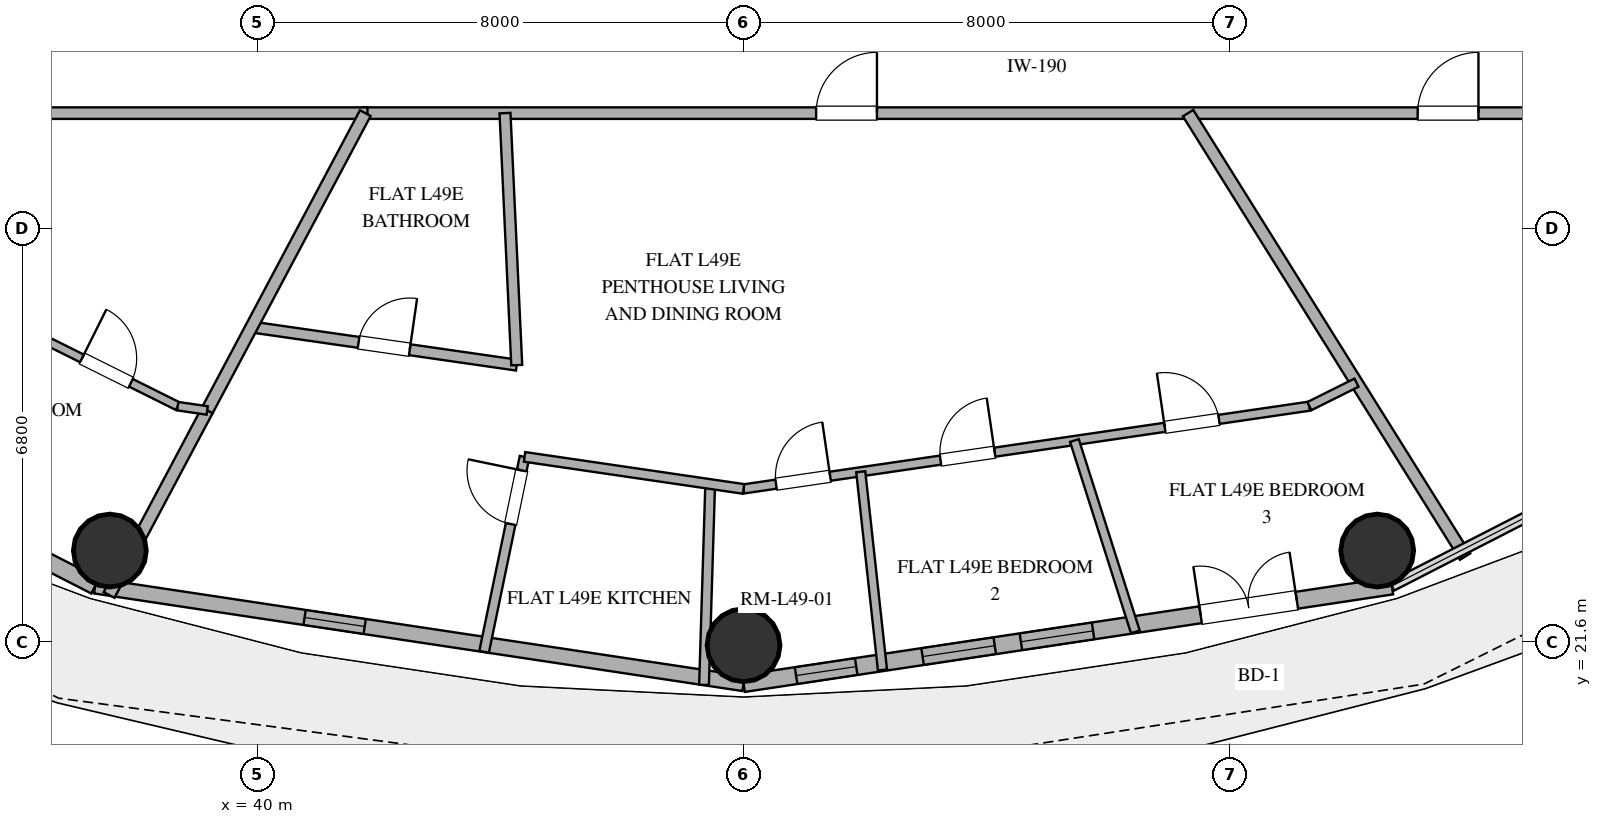
"""IFC4 building model, lengths in metres.
Left out: names, types, materials, properties, quantities, classifications, styles, units other than length and angle.
Written with IfcOpenShell. Run it as: python <this file> out.ifc"""

import sys

from ifc_helpers import new_model, si_unit, direction, frame, frame_2d, origin, origin_2d, place, context, subcontext, project, spatial, rectangle, hollow_circle, extrude, element, fill, save


model = new_model("IFC4")
c1 = context("Model", 3, precision=1e-05, world=origin(), true_north=direction((0.0, 1.0)))
c2 = subcontext(c1, "Body", "Model", "MODEL_VIEW")
j1 = project(units=[si_unit("LENGTHUNIT", "METRE"), si_unit("PLANEANGLEUNIT", "RADIAN")], contexts=[c1])
p1 = place(None, origin())
s1 = spatial("IfcSite", under=j1, at=p1, CompositionType="ELEMENT")
p2 = place(p1, origin())
s2 = spatial("IfcBuilding", under=s1, at=p2, CompositionType="ELEMENT")
p3 = place(p2, frame((0.0, 0.0, 193.8)))
s3 = spatial("IfcBuildingStorey", under=s2, at=p3, CompositionType="ELEMENT", Elevation=193.8)
for number, where, z_axis, x_axis in (
    (1, (37.578, 23.107, 0.0), (0.0, 0.0, 1.0), (1.0, 0.0, 0.0)),
    (2, (48.0, 21.55, 0.0), (0.0, 0.0, 1.0), (1.0, 0.0, 0.0)),
    (3, (58.422, 23.107, 0.0), (0.0, 0.0, 1.0), (1.0, 0.0, 0.0)),
):
    element("IfcColumn", number, at=place(p3, frame(where, z_axis=z_axis, x_axis=x_axis)), inside=s3, PredefinedType="COLUMN", context=c2, shape_type="SweptSolid", body=[
        extrude(hollow_circle(Radius=0.6, WallThickness=0.032, at=origin_2d()), origin(), (0.0, 0.0, 1.0), 3.38),
    ])
p4 = place(p3, frame((28.424, 27.094, 0.0), z_axis=(0.0, 0.0, 1.0), x_axis=(0.889872523182, -0.456209263919, 0.0)))
e4 = element("IfcWall", 4, at=p4, inside=s3, PredefinedType="SOLIDWALL", context=c2, shape_type="SweptSolid", body=[
    extrude(rectangle(XDim=10.016, YDim=0.28, at=frame_2d((5.008, 0.0))), origin(), (0.0, 0.0, 1.0), 3.38),
])
p5 = place(p4, frame((1.85, 0.0, 0.85)))
e5 = element("IfcOpeningElement", 5, at=p5, cuts=e4, PredefinedType="OPENING", context=c2, shape_type="SweptSolid", body=[
    extrude(rectangle(XDim=1.5, YDim=1.8, at=frame_2d((0.75, 0.9))), frame((0.0, 0.15, 0.0), z_axis=(0.0, -1.0, 0.0), x_axis=(1.0, 0.0, 0.0)), (0.0, 0.0, 1.0), 0.3),
])
p6 = place(p4, frame((4.695, 0.0, 0.85)))
e6 = element("IfcOpeningElement", 6, at=p6, cuts=e4, PredefinedType="OPENING", context=c2, shape_type="SweptSolid", body=[
    extrude(rectangle(XDim=1.35, YDim=1.8, at=frame_2d((0.675, 0.9))), frame((0.0, 0.15, 0.0), z_axis=(0.0, -1.0, 0.0), x_axis=(1.0, 0.0, 0.0)), (0.0, 0.0, 1.0), 0.3),
])
p7 = place(p4, frame((6.63, 0.0, 0.85)))
e7 = element("IfcOpeningElement", 7, at=p7, cuts=e4, PredefinedType="OPENING", context=c2, shape_type="SweptSolid", body=[
    extrude(rectangle(XDim=1.35, YDim=1.8, at=frame_2d((0.675, 0.9))), frame((0.0, 0.15, 0.0), z_axis=(0.0, -1.0, 0.0), x_axis=(1.0, 0.0, 0.0)), (0.0, 0.0, 1.0), 0.3),
])
p8 = place(p3, frame((37.337, 22.525, 0.0), z_axis=(0.0, 0.0, 1.0), x_axis=(0.988863993413, -0.148822049884, 0.0)))
e8 = element("IfcWall", 8, at=p8, inside=s3, PredefinedType="SOLIDWALL", context=c2, shape_type="SweptSolid", body=[
    extrude(rectangle(XDim=10.783, YDim=0.25, at=frame_2d((5.392, 0.0))), origin(), (0.0, 0.0, 1.0), 3.38),
])
p9 = place(p8, frame((3.482, 0.0, 0.35)))
e9 = element("IfcOpeningElement", 9, at=p9, cuts=e8, PredefinedType="OPENING", context=c2, shape_type="SweptSolid", body=[
    extrude(rectangle(XDim=1.0, YDim=1.05, at=frame_2d((0.5, 0.525))), frame((0.0, 0.135, 0.0), z_axis=(0.0, -1.0, 0.0), x_axis=(1.0, 0.0, 0.0)), (0.0, 0.0, 1.0), 0.27),
])
p10 = place(p3, frame((48.0, 20.92, 0.0), z_axis=(0.0, 0.0, 1.0), x_axis=(0.988863993413, 0.148822049884, 0.0)))
e10 = element("IfcWall", 10, at=p10, inside=s3, PredefinedType="SOLIDWALL", context=c2, shape_type="SweptSolid", body=[
    extrude(rectangle(XDim=10.783, YDim=0.28, at=frame_2d((5.392, 0.0))), origin(), (0.0, 0.0, 1.0), 3.38),
])
p11 = place(p10, frame((2.978, 0.0, 0.85)))
e11 = element("IfcOpeningElement", 11, at=p11, cuts=e10, PredefinedType="OPENING", context=c2, shape_type="SweptSolid", body=[
    extrude(rectangle(XDim=1.2, YDim=1.8, at=frame_2d((0.6, 0.9))), frame((0.0, 0.15, 0.0), z_axis=(0.0, -1.0, 0.0), x_axis=(1.0, 0.0, 0.0)), (0.0, 0.0, 1.0), 0.3),
])
p12 = place(p10, frame((4.613, 0.0, 0.85)))
e12 = element("IfcOpeningElement", 12, at=p12, cuts=e10, PredefinedType="OPENING", context=c2, shape_type="SweptSolid", body=[
    extrude(rectangle(XDim=1.2, YDim=1.8, at=frame_2d((0.6, 0.9))), frame((0.0, 0.15, 0.0), z_axis=(0.0, -1.0, 0.0), x_axis=(1.0, 0.0, 0.0)), (0.0, 0.0, 1.0), 0.3),
])
p13 = place(p10, frame((7.601, 0.0, 0.0)))
e13 = element("IfcOpeningElement", 13, at=p13, cuts=e10, PredefinedType="OPENING", context=c2, shape_type="SweptSolid", body=[
    extrude(rectangle(XDim=1.6, YDim=2.25, at=frame_2d((0.8, 1.125))), frame((0.0, 0.15, 0.0), z_axis=(0.0, -1.0, 0.0), x_axis=(1.0, 0.0, 0.0)), (0.0, 0.0, 1.0), 0.3),
])
p14 = place(p10, frame((0.874, 0.0, 0.85)))
e14 = element("IfcOpeningElement", 14, at=p14, cuts=e10, PredefinedType="OPENING", context=c2, shape_type="SweptSolid", body=[
    extrude(rectangle(XDim=1.0, YDim=1.8, at=frame_2d((0.5, 0.9))), frame((0.0, 0.15, 0.0), z_axis=(0.0, -1.0, 0.0), x_axis=(1.0, 0.0, 0.0)), (0.0, 0.0, 1.0), 0.3),
])
p15 = place(p3, frame((41.743, 30.3, 0.0), z_axis=(0.0, 0.0, 1.0), x_axis=(1.0, 0.0, 0.0)))
e15 = element("IfcWall", 15, at=p15, inside=s3, PredefinedType="PARTITIONING", context=c2, shape_type="SweptSolid", body=[
    extrude(rectangle(XDim=22.157, YDim=0.19, at=frame_2d((11.079, 0.0))), origin(), (0.0, 0.0, 1.0), 2.74),
])
p16 = place(p15, frame((7.451, 0.0, 0.0)))
e16 = element("IfcOpeningElement", 16, at=p16, cuts=e15, PredefinedType="OPENING", context=c2, shape_type="SweptSolid", body=[
    extrude(rectangle(XDim=1.0, YDim=2.2, at=frame_2d((0.5, 1.1))), frame((0.0, 0.105, 0.0), z_axis=(0.0, -1.0, 0.0), x_axis=(1.0, 0.0, 0.0)), (0.0, 0.0, 1.0), 0.21),
])
p17 = place(p15, frame((17.344, 0.0, 0.0)))
e17 = element("IfcOpeningElement", 17, at=p17, cuts=e15, PredefinedType="OPENING", context=c2, shape_type="SweptSolid", body=[
    extrude(rectangle(XDim=1.0, YDim=2.2, at=frame_2d((0.5, 1.1))), frame((0.0, 0.105, 0.0), z_axis=(0.0, -1.0, 0.0), x_axis=(1.0, 0.0, 0.0)), (0.0, 0.0, 1.0), 0.21),
])
p18 = place(p3, frame((41.815, 30.3, 0.0), z_axis=(0.0, 0.0, 1.0), x_axis=(-1.0, 0.0, 0.0)))
e18 = element("IfcWall", 18, at=p18, inside=s3, PredefinedType="PARTITIONING", context=c2, shape_type="SweptSolid", body=[
    extrude(rectangle(XDim=9.715, YDim=0.19, at=frame_2d((4.857, 0.0))), origin(), (0.0, 0.0, 1.0), 2.74),
])
p19 = place(p3, frame((59.868, 23.008, 0.0), z_axis=(0.0, 0.0, 1.0), x_axis=(-0.529914717401, 0.848050937315, 0.0)))
e19 = element("IfcWall", 19, at=p19, inside=s3, PredefinedType="PARTITIONING", context=c2, shape_type="SweptSolid", body=[
    extrude(rectangle(XDim=8.599, YDim=0.2, at=frame_2d((4.299, 0.0))), origin(), (0.0, 0.0, 1.0), 2.74),
])
p20 = place(p3, frame((39.909, 26.783, 0.0), z_axis=(0.0, 0.0, 1.0), x_axis=(0.989831677838, -0.142243627443, 0.0)))
e20 = element("IfcWall", 20, at=p20, inside=s3, PredefinedType="PLUMBINGWALL", context=c2, shape_type="SweptSolid", body=[
    extrude(rectangle(XDim=4.406, YDim=0.18, at=frame_2d((2.203, 0.0))), origin(), (0.0, 0.0, 1.0), 2.74),
])
p21 = place(p20, frame((1.778, 0.0, 0.0)))
e21 = element("IfcOpeningElement", 21, at=p21, cuts=e20, PredefinedType="OPENING", context=c2, shape_type="SweptSolid", body=[
    extrude(rectangle(XDim=0.85, YDim=2.1, at=frame_2d((0.425, 1.05))), frame((0.0, 0.1, 0.0), z_axis=(0.0, -1.0, 0.0), x_axis=(1.0, 0.0, 0.0)), (0.0, 0.0, 1.0), 0.2),
])
p22 = place(p3, frame((44.27, 26.156, 0.0), z_axis=(0.0, 0.0, 1.0), x_axis=(-0.046552902745, 0.998915825906, 0.0)))
e22 = element("IfcWall", 22, at=p22, inside=s3, PredefinedType="PLUMBINGWALL", context=c2, shape_type="SweptSolid", body=[
    extrude(rectangle(XDim=4.148, YDim=0.18, at=frame_2d((2.074, 0.0))), origin(), (0.0, 0.0, 1.0), 2.74),
])
p23 = place(p3, frame((39.179, 25.41, 0.0), z_axis=(0.0, 0.0, 1.0), x_axis=(0.469450659963, 0.88295870677, 0.0)))
e23 = element("IfcWall", 23, at=p23, inside=s3, PredefinedType="PARTITIONING", context=c2, shape_type="SweptSolid", body=[
    extrude(rectangle(XDim=5.538, YDim=0.2, at=frame_2d((2.769, 0.0))), origin(), (0.0, 0.0, 1.0), 2.74),
])
p24 = place(p3, frame((48.0, 24.12, 0.0), z_axis=(0.0, 0.0, 1.0), x_axis=(0.989474667704, 0.144706191892, 0.0)))
e24 = element("IfcWall", 24, at=p24, inside=s3, PredefinedType="PARTITIONING", context=c2, shape_type="SweptSolid", body=[
    extrude(rectangle(XDim=9.404, YDim=0.15, at=frame_2d((4.702, 0.0))), origin(), (0.0, 0.0, 1.0), 2.74),
])
p25 = place(p24, frame((7.002, 0.0, 0.0)))
e25 = element("IfcOpeningElement", 25, at=p25, cuts=e24, PredefinedType="OPENING", context=c2, shape_type="SweptSolid", body=[
    extrude(rectangle(XDim=0.9, YDim=2.1, at=frame_2d((0.45, 1.05))), frame((0.0, 0.085, 0.0), z_axis=(0.0, -1.0, 0.0), x_axis=(1.0, 0.0, 0.0)), (0.0, 0.0, 1.0), 0.17),
])
p26 = place(p24, frame((3.274, 0.0, 0.0)))
e26 = element("IfcOpeningElement", 26, at=p26, cuts=e24, PredefinedType="OPENING", context=c2, shape_type="SweptSolid", body=[
    extrude(rectangle(XDim=0.9, YDim=2.1, at=frame_2d((0.45, 1.05))), frame((0.0, 0.085, 0.0), z_axis=(0.0, -1.0, 0.0), x_axis=(1.0, 0.0, 0.0)), (0.0, 0.0, 1.0), 0.17),
])
p27 = place(p24, frame((0.54, 0.0, 0.0)))
e27 = element("IfcOpeningElement", 27, at=p27, cuts=e24, PredefinedType="OPENING", context=c2, shape_type="SweptSolid", body=[
    extrude(rectangle(XDim=0.9, YDim=2.1, at=frame_2d((0.45, 1.05))), frame((0.0, 0.085, 0.0), z_axis=(0.0, -1.0, 0.0), x_axis=(1.0, 0.0, 0.0)), (0.0, 0.0, 1.0), 0.17),
])
p28 = place(p3, frame((39.179, 25.41, 0.0), z_axis=(0.0, 0.0, 1.0), x_axis=(-0.469492799927, -0.882936300543, 0.0)))
e28 = element("IfcWall", 28, at=p28, inside=s3, PredefinedType="PARTITIONING", context=c2, shape_type="SweptSolid", body=[
    extrude(rectangle(XDim=3.437, YDim=0.2, at=frame_2d((1.718, 0.0))), origin(), (0.0, 0.0, 1.0), 2.74),
])
p29 = place(p3, frame((47.451, 24.2, 0.0), z_axis=(0.0, 0.0, 1.0), x_axis=(-0.03081032148, -0.999525249351, 0.0)))
e29 = element("IfcWall", 29, at=p29, inside=s3, PredefinedType="PLUMBINGWALL", context=c2, shape_type="SweptSolid", body=[
    extrude(rectangle(XDim=3.304, YDim=0.16, at=frame_2d((1.652, 0.0))), origin(), (0.0, 0.0, 1.0), 2.74),
])
p30 = place(p3, frame((53.442, 24.916, 0.0), z_axis=(0.0, 0.0, 1.0), x_axis=(0.303533258223, -0.952820844205, 0.0)))
e30 = element("IfcWall", 30, at=p30, inside=s3, PredefinedType="PARTITIONING", context=c2, shape_type="SweptSolid", body=[
    extrude(rectangle(XDim=3.302, YDim=0.15, at=frame_2d((1.651, 0.0))), origin(), (0.0, 0.0, 1.0), 2.74),
])
p31 = place(p3, frame((50.285, 21.143, 0.0), z_axis=(0.0, 0.0, 1.0), x_axis=(-0.108935832995, 0.994048783657, 0.0)))
e31 = element("IfcWall", 31, at=p31, inside=s3, PredefinedType="PARTITIONING", context=c2, shape_type="SweptSolid", body=[
    extrude(rectangle(XDim=3.279, YDim=0.15, at=frame_2d((1.639, 0.0))), origin(), (0.0, 0.0, 1.0), 2.74),
])
p32 = place(p3, frame((43.733, 21.441, 0.0), z_axis=(0.0, 0.0, 1.0), x_axis=(0.203194875639, 0.979138316334, 0.0)))
e32 = element("IfcWall", 32, at=p32, inside=s3, PredefinedType="PLUMBINGWALL", context=c2, shape_type="SweptSolid", body=[
    extrude(rectangle(XDim=3.274, YDim=0.16, at=frame_2d((1.637, 0.0))), origin(), (0.0, 0.0, 1.0), 2.74),
])
p33 = place(p32, frame((2.147, 0.0, 0.0)))
e33 = element("IfcOpeningElement", 33, at=p33, cuts=e32, PredefinedType="OPENING", context=c2, shape_type="SweptSolid", body=[
    extrude(rectangle(XDim=0.9, YDim=2.1, at=frame_2d((0.45, 1.05))), frame((0.0, 0.09, 0.0), z_axis=(0.0, -1.0, 0.0), x_axis=(1.0, 0.0, 0.0)), (0.0, 0.0, 1.0), 0.18),
])
p34 = place(p3, frame((44.398, 24.647, 0.0), z_axis=(0.0, 0.0, 1.0), x_axis=(0.989478635987, -0.144679054896, 0.0)))
e34 = element("IfcWall", 34, at=p34, inside=s3, PredefinedType="PLUMBINGWALL", context=c2, shape_type="SweptSolid", body=[
    extrude(rectangle(XDim=3.64, YDim=0.16, at=frame_2d((1.82, 0.0))), origin(), (0.0, 0.0, 1.0), 2.74),
])
p35 = place(p3, frame((36.349, 26.65, 0.0), z_axis=(0.0, 0.0, 1.0), x_axis=(0.895041110332, -0.445983644112, 0.0)))
e35 = element("IfcWall", 35, at=p35, inside=s3, PredefinedType="PARTITIONING", context=c2, shape_type="SweptSolid", body=[
    extrude(rectangle(XDim=2.621, YDim=0.14, at=frame_2d((1.311, 0.0))), origin(), (0.0, 0.0, 1.0), 2.74),
])
p36 = place(p35, frame((0.861, 0.0, 0.0)))
e36 = element("IfcOpeningElement", 36, at=p36, cuts=e35, PredefinedType="OPENING", context=c2, shape_type="SweptSolid", body=[
    extrude(rectangle(XDim=0.9, YDim=2.1, at=frame_2d((0.45, 1.05))), frame((0.0, 0.08, 0.0), z_axis=(0.0, -1.0, 0.0), x_axis=(1.0, 0.0, 0.0)), (0.0, 0.0, 1.0), 0.16),
])
p37 = place(p3, frame((57.305, 25.481, 0.0), z_axis=(0.0, 0.0, 1.0), x_axis=(0.895046131033, 0.445973567965, 0.0)))
e37 = element("IfcWall", 37, at=p37, inside=s3, PredefinedType="PARTITIONING", context=c2, shape_type="SweptSolid", body=[
    extrude(rectangle(XDim=0.867, YDim=0.15, at=frame_2d((0.433, 0.0))), origin(), (0.0, 0.0, 1.0), 2.74),
])
p38 = place(p3, frame((38.695, 25.481, 0.0), z_axis=(0.0, 0.0, 1.0), x_axis=(0.989485449351, -0.144632449754, 0.0)))
e38 = element("IfcWall", 38, at=p38, inside=s3, PredefinedType="PARTITIONING", context=c2, shape_type="SweptSolid", body=[
    extrude(rectangle(XDim=0.49, YDim=0.14, at=frame_2d((0.245, 0.0))), origin(), (0.0, 0.0, 1.0), 2.74),
])
p39 = place(p11, origin())
e39 = element("IfcWindow", 39, at=p39, inside=s3, PartitioningType="SINGLE_PANEL", PredefinedType="WINDOW", context=c2, shape_type="SweptSolid", body=[
    extrude(rectangle(XDim=1.2, YDim=1.8, at=frame_2d((0.6, 0.9))), frame((0.0, 0.03, 0.0), z_axis=(0.0, -1.0, 0.0), x_axis=(1.0, 0.0, 0.0)), (0.0, 0.0, 1.0), 0.06),
])
fill(e11, e39)
p40 = place(p12, origin())
e40 = element("IfcWindow", 40, at=p40, inside=s3, PartitioningType="SINGLE_PANEL", PredefinedType="WINDOW", context=c2, shape_type="SweptSolid", body=[
    extrude(rectangle(XDim=1.2, YDim=1.8, at=frame_2d((0.6, 0.9))), frame((0.0, 0.03, 0.0), z_axis=(0.0, -1.0, 0.0), x_axis=(1.0, 0.0, 0.0)), (0.0, 0.0, 1.0), 0.06),
])
fill(e12, e40)
p41 = place(p13, origin())
e41 = element("IfcDoor", 41, at=p41, inside=s3, OperationType="DOUBLE_DOOR_SINGLE_SWING", PredefinedType="DOOR", context=c2, shape_type="SweptSolid", body=[
    extrude(rectangle(XDim=1.6, YDim=2.25, at=frame_2d((0.8, 1.125))), frame((0.0, 0.025, 0.0), z_axis=(0.0, -1.0, 0.0), x_axis=(1.0, 0.0, 0.0)), (0.0, 0.0, 1.0), 0.05),
])
fill(e13, e41)
p42 = place(p9, origin())
e42 = element("IfcWindow", 42, at=p42, inside=s3, PartitioningType="SINGLE_PANEL", PredefinedType="WINDOW", context=c2, shape_type="SweptSolid", body=[
    extrude(rectangle(XDim=1.0, YDim=1.05, at=frame_2d((0.5, 0.525))), frame((0.0, 0.03, 0.0), z_axis=(0.0, -1.0, 0.0), x_axis=(1.0, 0.0, 0.0)), (0.0, 0.0, 1.0), 0.06),
])
fill(e9, e42)
p43 = place(p14, origin())
e43 = element("IfcWindow", 43, at=p43, inside=s3, PartitioningType="SINGLE_PANEL", PredefinedType="WINDOW", context=c2, shape_type="SweptSolid", body=[
    extrude(rectangle(XDim=1.0, YDim=1.8, at=frame_2d((0.5, 0.9))), frame((0.0, 0.03, 0.0), z_axis=(0.0, -1.0, 0.0), x_axis=(1.0, 0.0, 0.0)), (0.0, 0.0, 1.0), 0.06),
])
fill(e14, e43)
p44 = place(p16, origin())
e44 = element("IfcDoor", 44, at=p44, inside=s3, OperationType="SINGLE_SWING_RIGHT", PredefinedType="DOOR", context=c2, shape_type="SweptSolid", body=[
    extrude(rectangle(XDim=1.0, YDim=2.2, at=frame_2d((0.5, 1.1))), frame((0.0, 0.025, 0.0), z_axis=(0.0, -1.0, 0.0), x_axis=(1.0, 0.0, 0.0)), (0.0, 0.0, 1.0), 0.05),
])
fill(e16, e44)
p45 = place(p17, origin())
e45 = element("IfcDoor", 45, at=p45, inside=s3, OperationType="SINGLE_SWING_RIGHT", PredefinedType="DOOR", context=c2, shape_type="SweptSolid", body=[
    extrude(rectangle(XDim=1.0, YDim=2.2, at=frame_2d((0.5, 1.1))), frame((0.0, 0.025, 0.0), z_axis=(0.0, -1.0, 0.0), x_axis=(1.0, 0.0, 0.0)), (0.0, 0.0, 1.0), 0.05),
])
fill(e17, e45)
p46 = place(p21, origin())
e46 = element("IfcDoor", 46, at=p46, inside=s3, OperationType="SINGLE_SWING_RIGHT", PredefinedType="DOOR", context=c2, shape_type="SweptSolid", body=[
    extrude(rectangle(XDim=0.85, YDim=2.1, at=frame_2d((0.425, 1.05))), frame((0.0, 0.025, 0.0), z_axis=(0.0, -1.0, 0.0), x_axis=(1.0, 0.0, 0.0)), (0.0, 0.0, 1.0), 0.05),
])
fill(e21, e46)
p47 = place(p25, origin())
e47 = element("IfcDoor", 47, at=p47, inside=s3, OperationType="SINGLE_SWING_LEFT", PredefinedType="DOOR", context=c2, shape_type="SweptSolid", body=[
    extrude(rectangle(XDim=0.9, YDim=2.1, at=frame_2d((0.45, 1.05))), frame((0.0, 0.025, 0.0), z_axis=(0.0, -1.0, 0.0), x_axis=(1.0, 0.0, 0.0)), (0.0, 0.0, 1.0), 0.05),
])
fill(e25, e47)
p48 = place(p26, origin())
e48 = element("IfcDoor", 48, at=p48, inside=s3, OperationType="SINGLE_SWING_RIGHT", PredefinedType="DOOR", context=c2, shape_type="SweptSolid", body=[
    extrude(rectangle(XDim=0.9, YDim=2.1, at=frame_2d((0.45, 1.05))), frame((0.0, 0.025, 0.0), z_axis=(0.0, -1.0, 0.0), x_axis=(1.0, 0.0, 0.0)), (0.0, 0.0, 1.0), 0.05),
])
fill(e26, e48)
p49 = place(p27, origin())
e49 = element("IfcDoor", 49, at=p49, inside=s3, OperationType="SINGLE_SWING_RIGHT", PredefinedType="DOOR", context=c2, shape_type="SweptSolid", body=[
    extrude(rectangle(XDim=0.9, YDim=2.1, at=frame_2d((0.45, 1.05))), frame((0.0, 0.025, 0.0), z_axis=(0.0, -1.0, 0.0), x_axis=(1.0, 0.0, 0.0)), (0.0, 0.0, 1.0), 0.05),
])
fill(e27, e49)
p50 = place(p33, origin())
e50 = element("IfcDoor", 50, at=p50, inside=s3, OperationType="SINGLE_SWING_RIGHT", PredefinedType="DOOR", context=c2, shape_type="SweptSolid", body=[
    extrude(rectangle(XDim=0.9, YDim=2.1, at=frame_2d((0.45, 1.05))), frame((0.0, 0.025, 0.0), z_axis=(0.0, -1.0, 0.0), x_axis=(1.0, 0.0, 0.0)), (0.0, 0.0, 1.0), 0.05),
])
fill(e33, e50)
p51 = place(p36, origin())
e51 = element("IfcDoor", 51, at=p51, inside=s3, OperationType="SINGLE_SWING_LEFT", PredefinedType="DOOR", context=c2, shape_type="SweptSolid", body=[
    extrude(rectangle(XDim=0.9, YDim=2.1, at=frame_2d((0.45, 1.05))), frame((0.0, 0.025, 0.0), z_axis=(0.0, -1.0, 0.0), x_axis=(1.0, 0.0, 0.0)), (0.0, 0.0, 1.0), 0.05),
])
fill(e36, e51)
save(model, sys.argv[1])
